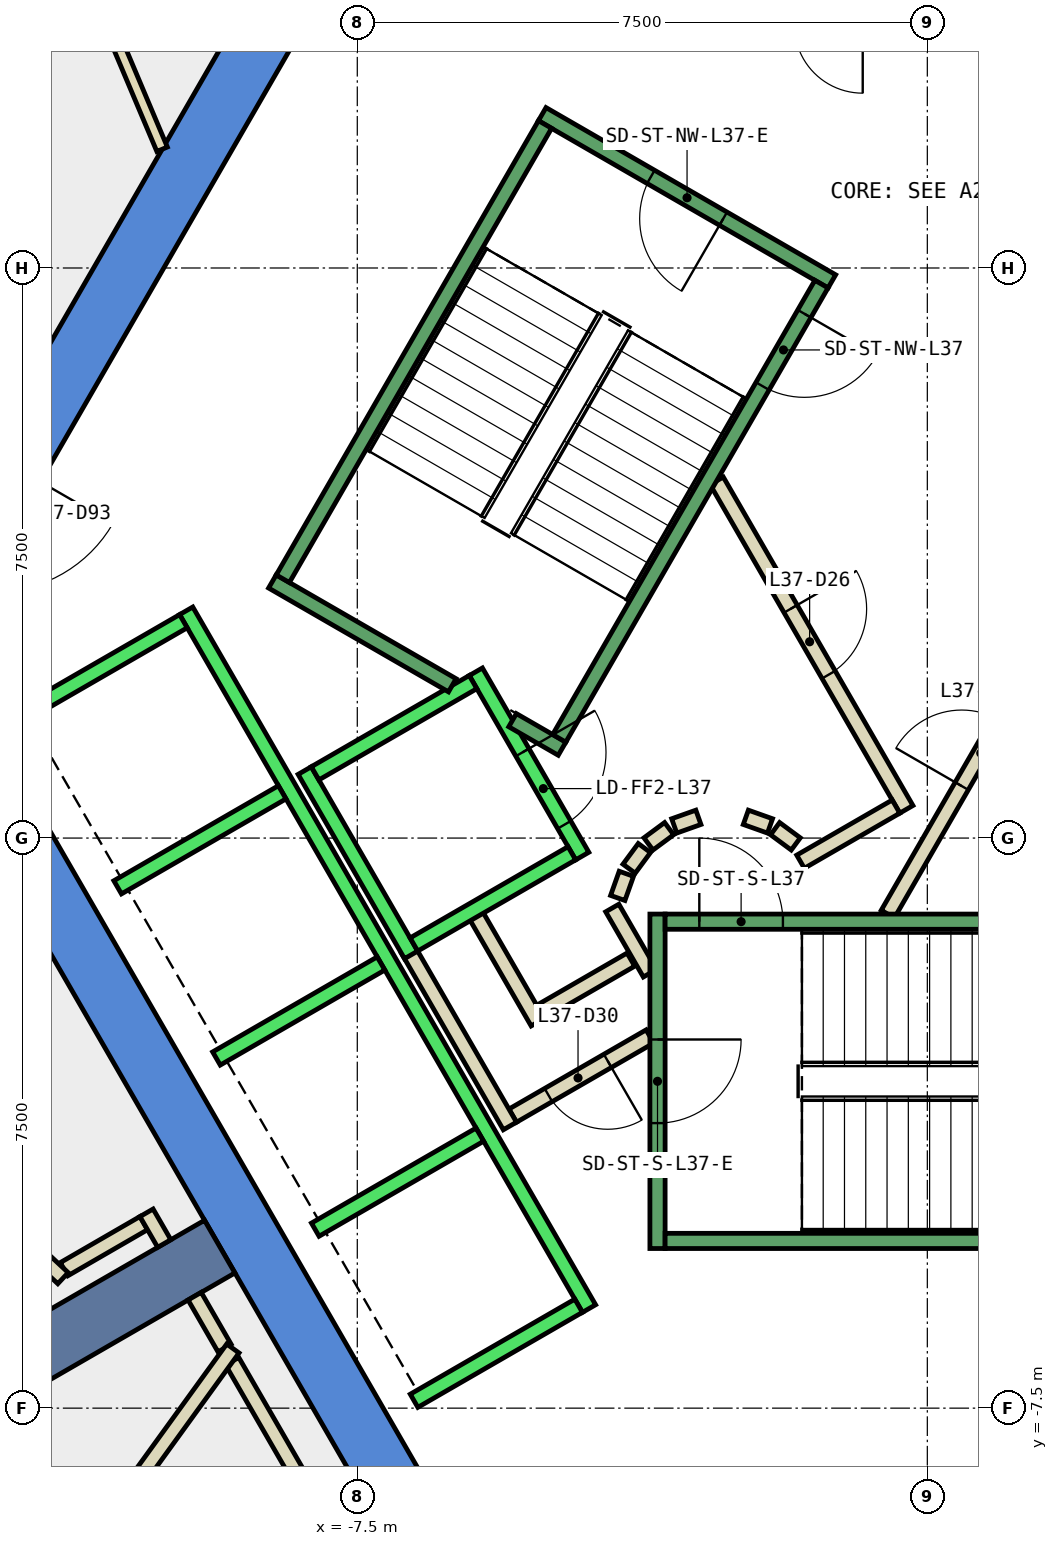
"""IFC4 building model, lengths in metres.
Left out: names, types, materials, properties, quantities, classifications, styles, units other than length and angle.
Written with IfcOpenShell. Run it as: python <this file> out.ifc"""

import sys

from ifc_helpers import new_model, si_unit, direction, frame, frame_2d, origin, place, context, subcontext, project, spatial, polyline, rectangle, outline, extrude, element, fill, save


model = new_model("IFC4")
c1 = context("Model", 3, precision=1e-05, world=origin(), true_north=direction((0.0, 1.0)))
c2 = subcontext(c1, "Body", "Model", "MODEL_VIEW")
j1 = project(units=[si_unit("LENGTHUNIT", "METRE"), si_unit("PLANEANGLEUNIT", "RADIAN")], contexts=[c1])
p1 = place(None, origin())
s1 = spatial("IfcSite", under=j1, at=p1, CompositionType="ELEMENT")
p2 = place(p1, origin())
s2 = spatial("IfcBuilding", under=s1, at=p2, CompositionType="ELEMENT")
p3 = place(p2, frame((0.0, 0.0, 167.6)))
s3 = spatial("IfcBuildingStorey", under=s2, at=p3, CompositionType="ELEMENT", Elevation=167.6)
p4 = place(p3, frame((0.0, 0.0, -0.4)))
e1 = element("IfcWall", 1, at=p4, inside=s3, PredefinedType="SHEAR", context=c2, shape_type="SweptSolid", body=[
    extrude(outline(polyline([(-12.267, 5.252), (-11.575, 4.852), (-6.466, 13.7), (-6.928, 14.5), (-12.267, 5.252)])), origin(), (0.0, 0.0, 1.0), 4.2),
])
p5 = place(p3, frame((0.0, 0.0, -0.4)))
e2 = element("IfcWall", 2, at=p5, inside=s3, PredefinedType="SHEAR", context=c2, shape_type="SweptSolid", body=[
    extrude(outline(polyline([(-13.856, 2.5), (-6.928, -9.5), (-6.466, -8.7), (-12.933, 2.5), (-13.856, 2.5)])), origin(), (0.0, 0.0, 1.0), 4.2),
])
p6 = place(p3, frame((-9.31, -5.375, -0.4), z_axis=(0.0, 0.0, 1.0), x_axis=(-0.866017533419, -0.500013631625, 0.0)))
e3 = element("IfcWall", 3, at=p6, inside=s3, PredefinedType="SHEAR", context=c2, shape_type="SweptSolid", body=[
    extrude(rectangle(XDim=9.0, YDim=0.8, at=frame_2d((4.5, 0.0))), origin(), (0.0, 0.0, 1.0), 4.2),
])
p7 = place(p3, frame((-3.9, -1.599, 0.0), z_axis=(0.0, 0.0, 1.0), x_axis=(-0.865969445389, -0.500096910261, 0.0)))
e4 = element("IfcWall", 4, at=p7, inside=s3, PredefinedType="PARTITIONING", context=c2, shape_type="SweptSolid", body=[
    extrude(rectangle(XDim=1.373, YDim=0.2, at=frame_2d((0.687, 0.0))), origin(), (0.0, 0.0, 1.0), 3.8),
])
p8 = place(p3, frame((-5.126, -2.422, 0.0), z_axis=(0.0, 0.0, 1.0), x_axis=(-0.500062241894, 0.865989465428, 0.0)))
e5 = element("IfcWall", 5, at=p8, inside=s3, PredefinedType="PARTITIONING", context=c2, shape_type="SweptSolid", body=[
    extrude(rectangle(XDim=1.7, YDim=0.2, at=frame_2d((0.85, 0.0))), origin(), (0.0, 0.0, 1.0), 3.8),
])
p9 = place(p3, frame((-3.65, -2.61, 0.0), z_axis=(0.0, 0.0, 1.0), x_axis=(-0.866072462134, -0.499918483688, 0.0)))
e6 = element("IfcWall", 6, at=p9, inside=s3, PredefinedType="PARTITIONING", context=c2, shape_type="SweptSolid", body=[
    extrude(rectangle(XDim=2.084, YDim=0.2, at=frame_2d((1.042, 0.0))), origin(), (0.0, 0.0, 1.0), 3.8),
])
p10 = place(p9, frame((0.642, 0.0, 0.0)))
e7 = element("IfcOpeningElement", 7, at=p10, cuts=e6, PredefinedType="OPENING", context=c2, shape_type="SweptSolid", body=[
    extrude(rectangle(XDim=0.9, YDim=2.1, at=frame_2d((0.45, 1.05))), frame((0.0, 0.11, 0.0), z_axis=(0.0, -1.0, 0.0), x_axis=(1.0, 0.0, 0.0)), (0.0, 0.0, 1.0), 0.22),
])
p11 = place(p3, frame((-5.492, -3.788, 0.0), z_axis=(0.0, 0.0, 1.0), x_axis=(-0.500008949224, 0.866020236886, 0.0)))
e8 = element("IfcWall", 8, at=p11, inside=s3, PredefinedType="PARTITIONING", context=c2, shape_type="SweptSolid", body=[
    extrude(rectangle(XDim=2.68, YDim=0.2, at=frame_2d((1.34, 0.0))), origin(), (0.0, 0.0, 1.0), 3.8),
])
p12 = place(p3, frame((-4.145, -0.92, 0.0), z_axis=(0.0, 0.0, 1.0), x_axis=(0.499743786207, -0.866173278362, 0.0)))
e9 = element("IfcWall", 9, at=p12, inside=s3, PredefinedType="PARTITIONING", context=c2, shape_type="SweptSolid", body=[
    extrude(rectangle(XDim=0.991, YDim=0.2, at=frame_2d((0.495, 0.0))), origin(), (0.0, 0.0, 1.0), 3.8),
])
p13 = place(p3, frame((-10.068, 9.062, 0.0), z_axis=(0.0, 0.0, 1.0), x_axis=(-0.388992587102, 0.921240884448, 0.0)))
e10 = element("IfcWall", 10, at=p13, inside=s3, PredefinedType="PARTITIONING", context=c2, shape_type="SweptSolid", body=[
    extrude(rectangle(XDim=4.257, YDim=0.15, at=frame_2d((2.128, 0.0))), origin(), (0.0, 0.0, 1.0), 3.8),
])
p14 = place(p3, frame((-0.52, -1.0, 0.0), z_axis=(0.0, 0.0, 1.0), x_axis=(0.50011622646, 0.865958290007, 0.0)))
e11 = element("IfcWall", 11, at=p14, inside=s3, PredefinedType="PARTITIONING", context=c2, shape_type="SweptSolid", body=[
    extrude(rectangle(XDim=4.991, YDim=0.2, at=frame_2d((2.496, 0.0))), origin(), (0.0, 0.0, 1.0), 3.8),
])
p15 = place(p14, frame((1.945, 0.0, 0.0)))
e12 = element("IfcOpeningElement", 12, at=p15, cuts=e11, PredefinedType="OPENING", context=c2, shape_type="SweptSolid", body=[
    extrude(rectangle(XDim=1.0, YDim=2.1, at=frame_2d((0.5, 1.05))), frame((0.0, 0.11, 0.0), z_axis=(0.0, -1.0, 0.0), x_axis=(1.0, 0.0, 0.0)), (0.0, 0.0, 1.0), 0.22),
])
p16 = place(p3, frame((-2.771, 4.7, 0.0), z_axis=(0.0, 0.0, 1.0), x_axis=(0.499969479948, -0.866043023828, 0.0)))
e13 = element("IfcWall", 13, at=p16, inside=s3, PredefinedType="PARTITIONING", context=c2, shape_type="SweptSolid", body=[
    extrude(rectangle(XDim=4.99, YDim=0.2, at=frame_2d((2.495, 0.0))), origin(), (0.0, 0.0, 1.0), 3.8),
])
p17 = place(p16, frame((1.945, 0.0, 0.0)))
e14 = element("IfcOpeningElement", 14, at=p17, cuts=e13, PredefinedType="OPENING", context=c2, shape_type="SweptSolid", body=[
    extrude(rectangle(XDim=1.0, YDim=2.1, at=frame_2d((0.5, 1.05))), frame((0.0, 0.11, 0.0), z_axis=(0.0, -1.0, 0.0), x_axis=(1.0, 0.0, 0.0)), (0.0, 0.0, 1.0), 0.22),
])
p18 = place(p3, frame((-0.412, 0.414, 0.0), z_axis=(0.0, 0.0, 1.0), x_axis=(-0.866017369001, -0.500013916395, 0.0)))
e15 = element("IfcWall", 15, at=p18, inside=s3, PredefinedType="PARTITIONING", context=c2, shape_type="SweptSolid", body=[
    extrude(rectangle(XDim=1.45, YDim=0.2, at=frame_2d((0.725, 0.0))), origin(), (0.0, 0.0, 1.0), 3.8),
])
p19 = place(p3, frame((-1.731, -0.077, 0.0), z_axis=(0.0, 0.0, 1.0), x_axis=(-0.804311165252, 0.594208338422, 0.0)))
e16 = element("IfcWall", 16, at=p19, inside=s3, PredefinedType="PARTITIONING", context=c2, shape_type="SweptSolid", body=[
    extrude(rectangle(XDim=0.338, YDim=0.2, at=frame_2d((0.169, 0.0))), origin(), (0.0, 0.0, 1.0), 3.8),
])
p20 = place(p3, frame((-2.07, 0.16, 0.0), z_axis=(0.0, 0.0, 1.0), x_axis=(-0.942199461132, 0.335052496547, 0.0)))
e17 = element("IfcWall", 17, at=p20, inside=s3, PredefinedType="PARTITIONING", context=c2, shape_type="SweptSolid", body=[
    extrude(rectangle(XDim=0.337, YDim=0.2, at=frame_2d((0.169, 0.0))), origin(), (0.0, 0.0, 1.0), 3.8),
])
p21 = place(p3, frame((-3.012, 0.273, 0.0), z_axis=(0.0, 0.0, 1.0), x_axis=(-0.942280615813, -0.334824194261, 0.0)))
e18 = element("IfcWall", 18, at=p21, inside=s3, PredefinedType="PARTITIONING", context=c2, shape_type="SweptSolid", body=[
    extrude(rectangle(XDim=0.338, YDim=0.2, at=frame_2d((0.169, 0.0))), origin(), (0.0, 0.0, 1.0), 3.8),
])
p22 = place(p3, frame((-3.397, 0.124, 0.0), z_axis=(0.0, 0.0, 1.0), x_axis=(-0.804311165252, -0.594208338422, 0.0)))
e19 = element("IfcWall", 19, at=p22, inside=s3, PredefinedType="PARTITIONING", context=c2, shape_type="SweptSolid", body=[
    extrude(rectangle(XDim=0.338, YDim=0.2, at=frame_2d((0.169, 0.0))), origin(), (0.0, 0.0, 1.0), 3.8),
])
p23 = place(p3, frame((-3.723, -0.131, 0.0), z_axis=(0.0, 0.0, 1.0), x_axis=(-0.594675113454, -0.803966112121, 0.0)))
e20 = element("IfcWall", 20, at=p23, inside=s3, PredefinedType="PARTITIONING", context=c2, shape_type="SweptSolid", body=[
    extrude(rectangle(XDim=0.338, YDim=0.2, at=frame_2d((0.169, 0.0))), origin(), (0.0, 0.0, 1.0), 3.8),
])
p24 = place(p3, frame((-3.96, -0.47, 0.0), z_axis=(0.0, 0.0, 1.0), x_axis=(-0.334824194261, -0.942280615813, 0.0)))
e21 = element("IfcWall", 21, at=p24, inside=s3, PredefinedType="PARTITIONING", context=c2, shape_type="SweptSolid", body=[
    extrude(rectangle(XDim=0.338, YDim=0.2, at=frame_2d((0.169, 0.0))), origin(), (0.0, 0.0, 1.0), 3.8),
])
p25 = place(p3, frame((-7.862, -9.107, 0.0), z_axis=(0.0, 0.0, 1.0), x_axis=(-0.499994038704, 0.866028845513, 0.0)))
e22 = element("IfcWall", 22, at=p25, inside=s3, PredefinedType="PARTITIONING", context=c2, shape_type="SweptSolid", body=[
    extrude(rectangle(XDim=2.568, YDim=0.2, at=frame_2d((1.284, 0.0))), origin(), (0.0, 0.0, 1.0), 3.8),
])
p26 = place(p3, frame((-9.246, -6.71, 0.0), z_axis=(0.0, 0.0, 1.0), x_axis=(-0.499570510076, 0.86627322795, 0.0)))
e23 = element("IfcWall", 23, at=p26, inside=s3, PredefinedType="PARTITIONING", context=c2, shape_type="SweptSolid", body=[
    extrude(rectangle(XDim=0.788, YDim=0.2, at=frame_2d((0.394, 0.0))), origin(), (0.0, 0.0, 1.0), 3.8),
])
p27 = place(p3, frame((-10.31, -5.066, 0.0), z_axis=(0.0, 0.0, 1.0), x_axis=(-0.865587329375, -0.500758000661, 0.0)))
e24 = element("IfcWall", 24, at=p27, inside=s3, PredefinedType="PARTITIONING", context=c2, shape_type="SweptSolid", body=[
    extrude(rectangle(XDim=1.21, YDim=0.2, at=frame_2d((0.605, 0.0))), origin(), (0.0, 0.0, 1.0), 3.8),
])
p28 = place(p3, frame((-11.372, -5.79, 0.0), z_axis=(0.0, 0.0, 1.0), x_axis=(-0.730922728623, 0.682460229451, 0.0)))
e25 = element("IfcWall", 25, at=p28, inside=s3, PredefinedType="PARTITIONING", context=c2, shape_type="SweptSolid", body=[
    extrude(rectangle(XDim=9.924, YDim=0.2, at=frame_2d((4.962, 0.0))), origin(), (0.0, 0.0, 1.0), 3.8),
])
p29 = place(p3, frame((-13.744, -13.076, 0.0), z_axis=(0.0, 0.0, 1.0), x_axis=(0.586577314901, 0.809893235953, 0.0)))
e26 = element("IfcWall", 26, at=p29, inside=s3, PredefinedType="PARTITIONING", context=c2, shape_type="SweptSolid", body=[
    extrude(rectangle(XDim=7.854, YDim=0.2, at=frame_2d((3.927, 0.0))), origin(), (0.0, 0.0, 1.0), 3.8),
])
p30 = place(p3, frame((-10.04, -5.334, 0.0), z_axis=(0.0, 0.0, 1.0), x_axis=(-0.499405191234, 0.86636854454, 0.0)))
e27 = element("IfcWall", 27, at=p30, inside=s3, PredefinedType="PARTITIONING", context=c2, shape_type="SweptSolid", body=[
    extrude(rectangle(XDim=0.466, YDim=0.2, at=frame_2d((0.233, 0.0))), origin(), (0.0, 0.0, 1.0), 3.8),
])
p31 = place(p3, frame((-5.94, 2.188, 0.0), z_axis=(0.0, 0.0, 1.0), x_axis=(0.49994636267, -0.866056369097, 0.0)))
e28 = element("IfcWall", 28, at=p31, inside=s3, PredefinedType="STANDARD", context=c2, shape_type="SweptSolid", body=[
    extrude(rectangle(XDim=2.8, YDim=0.2, at=frame_2d((1.4, 0.0))), origin(), (0.0, 0.0, 1.0), 3.8),
])
p32 = place(p31, frame((1.225, 0.0, 0.0)))
e29 = element("IfcOpeningElement", 29, at=p32, cuts=e28, PredefinedType="OPENING", context=c2, shape_type="SweptSolid", body=[
    extrude(rectangle(XDim=1.1, YDim=2.1, at=frame_2d((0.55, 1.05))), frame((0.0, 0.11, 0.0), z_axis=(0.0, -1.0, 0.0), x_axis=(1.0, 0.0, 0.0)), (0.0, 0.0, 1.0), 0.22),
])
p33 = place(p3, frame((-8.192, 0.888, 0.0), z_axis=(0.0, 0.0, 1.0), x_axis=(0.49994636267, -0.866056369097, 0.0)))
e30 = element("IfcWall", 30, at=p33, inside=s3, PredefinedType="STANDARD", context=c2, shape_type="SweptSolid", body=[
    extrude(rectangle(XDim=2.8, YDim=0.2, at=frame_2d((1.4, 0.0))), origin(), (0.0, 0.0, 1.0), 3.8),
])
for number, where, z_axis, x_axis in (
    (31, (-5.977, 2.052, 0.0), (0.0, 0.0, 1.0), (-0.866, -0.5, 0.0)),
    (32, (-4.677, -0.2, 0.0), (0.0, 0.0, 1.0), (-0.866, -0.5, 0.0)),
):
    element("IfcWall", number, at=place(p3, frame(where, z_axis=z_axis, x_axis=x_axis)), inside=s3, PredefinedType="STANDARD", context=c2, shape_type="SweptSolid", body=[
        extrude(rectangle(XDim=2.399, YDim=0.2, at=frame_2d((1.2, 0.0))), origin(), (0.0, 0.0, 1.0), 3.8),
    ])
p34 = place(p3, frame((-9.751, 2.99, 0.0), z_axis=(0.0, 0.0, 1.0), x_axis=(0.50000090737, -0.866024879913, 0.0)))
e33 = element("IfcWall", 33, at=p34, inside=s3, PredefinedType="STANDARD", context=c2, shape_type="SweptSolid", body=[
    extrude(rectangle(XDim=10.6, YDim=0.2, at=frame_2d((5.3, 0.0))), origin(), (0.0, 0.0, 1.0), 3.8),
])
p35 = place(p3, frame((-9.788, 2.853, 0.0), z_axis=(0.0, 0.0, 1.0), x_axis=(-0.865998541277, -0.500046524342, 0.0)))
e34 = element("IfcWall", 34, at=p35, inside=s3, PredefinedType="STANDARD", context=c2, shape_type="SweptSolid", body=[
    extrude(rectangle(XDim=2.5, YDim=0.2, at=frame_2d((1.25, 0.0))), origin(), (0.0, 0.0, 1.0), 3.8),
])
for number, where, z_axis, x_axis in (
    (35, (-8.488, 0.602, 0.0), (0.0, 0.0, 1.0), (-0.866, -0.5, 0.0)),
    (36, (-7.188, -1.65, 0.0), (0.0, 0.0, 1.0), (-0.866, -0.5, 0.0)),
    (37, (-5.888, -3.902, 0.0), (0.0, 0.0, 1.0), (-0.866, -0.5, 0.0)),
    (38, (-4.588, -6.153, 0.0), (0.0, 0.0, 1.0), (-0.866, -0.5, 0.0)),
):
    element("IfcWall", number, at=place(p3, frame(where, z_axis=z_axis, x_axis=x_axis)), inside=s3, PredefinedType="STANDARD", context=c2, shape_type="SweptSolid", body=[
        extrude(rectangle(XDim=2.5, YDim=0.2, at=frame_2d((1.25, 0.0))), origin(), (0.0, 0.0, 1.0), 3.8),
    ])
p36 = place(p3, frame((-3.55, -1.0, 0.0), z_axis=(0.0, 0.0, 1.0), x_axis=(0.0, -1.0, 0.0)))
e39 = element("IfcWall", 39, at=p36, inside=s3, PredefinedType="STANDARD", context=c2, shape_type="SweptSolid", body=[
    extrude(rectangle(XDim=4.4, YDim=0.2, at=frame_2d((2.2, 0.0))), origin(), (0.0, 0.0, 1.0), 3.8),
])
p37 = place(p36, frame((1.65, 0.0, 0.0)))
e40 = element("IfcOpeningElement", 40, at=p37, cuts=e39, PredefinedType="OPENING", context=c2, shape_type="SweptSolid", body=[
    extrude(rectangle(XDim=1.1, YDim=2.2, at=frame_2d((0.55, 1.1))), frame((0.0, 0.11, 0.0), z_axis=(0.0, -1.0, 0.0), x_axis=(1.0, 0.0, 0.0)), (0.0, 0.0, 1.0), 0.22),
])
p38 = place(p3, frame((-3.45, -1.1, 0.0), z_axis=(0.0, 0.0, 1.0), x_axis=(1.0, 0.0, 0.0)))
e41 = element("IfcWall", 41, at=p38, inside=s3, PredefinedType="STANDARD", context=c2, shape_type="SweptSolid", body=[
    extrude(rectangle(XDim=6.9, YDim=0.2, at=frame_2d((3.45, 0.0))), origin(), (0.0, 0.0, 1.0), 3.8),
])
p39 = place(p38, frame((0.45, 0.0, 0.0)))
e42 = element("IfcOpeningElement", 42, at=p39, cuts=e41, PredefinedType="OPENING", context=c2, shape_type="SweptSolid", body=[
    extrude(rectangle(XDim=1.1, YDim=2.2, at=frame_2d((0.55, 1.1))), frame((0.0, 0.11, 0.0), z_axis=(0.0, -1.0, 0.0), x_axis=(1.0, 0.0, 0.0)), (0.0, 0.0, 1.0), 0.22),
])
p40 = place(p3, frame((-3.45, -5.3, 0.0), z_axis=(0.0, 0.0, 1.0), x_axis=(1.0, 0.0, 0.0)))
e43 = element("IfcWall", 43, at=p40, inside=s3, PredefinedType="STANDARD", context=c2, shape_type="SweptSolid", body=[
    extrude(rectangle(XDim=6.9, YDim=0.2, at=frame_2d((3.45, 0.0))), origin(), (0.0, 0.0, 1.0), 3.8),
])
p41 = place(p3, frame((-1.256, 7.324, 0.0), z_axis=(0.0, 0.0, 1.0), x_axis=(-0.866046073146, 0.499964197906, 0.0)))
e44 = element("IfcWall", 44, at=p41, inside=s3, PredefinedType="STANDARD", context=c2, shape_type="SweptSolid", body=[
    extrude(rectangle(XDim=4.4, YDim=0.2, at=frame_2d((2.2, 0.0))), origin(), (0.0, 0.0, 1.0), 3.8),
])
p42 = place(p41, frame((1.65, 0.0, 0.0)))
e45 = element("IfcOpeningElement", 45, at=p42, cuts=e44, PredefinedType="OPENING", context=c2, shape_type="SweptSolid", body=[
    extrude(rectangle(XDim=1.1, YDim=2.2, at=frame_2d((0.55, 1.1))), frame((0.0, 0.11, 0.0), z_axis=(0.0, -1.0, 0.0), x_axis=(1.0, 0.0, 0.0)), (0.0, 0.0, 1.0), 0.22),
])
p43 = place(p3, frame((-6.25, 2.01, 0.0), z_axis=(0.0, 0.0, 1.0), x_axis=(-0.86611865017, 0.499838457731, 0.0)))
e46 = element("IfcWall", 46, at=p43, inside=s3, PredefinedType="STANDARD", context=c2, shape_type="SweptSolid", body=[
    extrude(rectangle(XDim=2.733, YDim=0.2, at=frame_2d((1.366, 0.0))), origin(), (0.0, 0.0, 1.0), 3.8),
])
p44 = place(p3, frame((-4.806, 1.176, 0.0), z_axis=(0.0, 0.0, 1.0), x_axis=(-0.866558586415, 0.499075361355, 0.0)))
e47 = element("IfcWall", 47, at=p44, inside=s3, PredefinedType="STANDARD", context=c2, shape_type="SweptSolid", body=[
    extrude(rectangle(XDim=0.751, YDim=0.2, at=frame_2d((0.376, 0.0))), origin(), (0.0, 0.0, 1.0), 3.8),
])
p45 = place(p3, frame((-1.393, 7.288, 0.0), z_axis=(0.0, 0.0, 1.0), x_axis=(-0.499963383562, -0.866046543262, 0.0)))
e48 = element("IfcWall", 48, at=p45, inside=s3, PredefinedType="STANDARD", context=c2, shape_type="SweptSolid", body=[
    extrude(rectangle(XDim=6.9, YDim=0.2, at=frame_2d((3.45, 0.0))), origin(), (0.0, 0.0, 1.0), 3.8),
])
p46 = place(p45, frame((0.45, 0.0, 0.0)))
e49 = element("IfcOpeningElement", 49, at=p46, cuts=e48, PredefinedType="OPENING", context=c2, shape_type="SweptSolid", body=[
    extrude(rectangle(XDim=1.1, YDim=2.2, at=frame_2d((0.55, 1.1))), frame((0.0, 0.11, 0.0), z_axis=(0.0, -1.0, 0.0), x_axis=(1.0, 0.0, 0.0)), (0.0, 0.0, 1.0), 0.22),
])
p47 = place(p3, frame((-5.03, 9.388, 0.0), z_axis=(0.0, 0.0, 1.0), x_axis=(-0.499978703459, -0.866037698999, 0.0)))
e50 = element("IfcWall", 50, at=p47, inside=s3, PredefinedType="STANDARD", context=c2, shape_type="SweptSolid", body=[
    extrude(rectangle(XDim=6.9, YDim=0.2, at=frame_2d((3.45, 0.0))), origin(), (0.0, 0.0, 1.0), 3.8),
])
p48 = place(p15, origin())
e51 = element("IfcDoor", 51, at=p48, inside=s3, OperationType="SINGLE_SWING_LEFT", PredefinedType="DOOR", context=c2, shape_type="SweptSolid", body=[
    extrude(rectangle(XDim=1.0, YDim=2.1, at=frame_2d((0.5, 1.05))), frame((0.0, 0.025, 0.0), z_axis=(0.0, -1.0, 0.0), x_axis=(1.0, 0.0, 0.0)), (0.0, 0.0, 1.0), 0.05),
])
fill(e12, e51)
p49 = place(p17, origin())
e52 = element("IfcDoor", 52, at=p49, inside=s3, OperationType="SINGLE_SWING_RIGHT", PredefinedType="DOOR", context=c2, shape_type="SweptSolid", body=[
    extrude(rectangle(XDim=1.0, YDim=2.1, at=frame_2d((0.5, 1.05))), frame((0.0, 0.025, 0.0), z_axis=(0.0, -1.0, 0.0), x_axis=(1.0, 0.0, 0.0)), (0.0, 0.0, 1.0), 0.05),
])
fill(e14, e52)
p50 = place(p10, origin())
e53 = element("IfcDoor", 53, at=p50, inside=s3, OperationType="SINGLE_SWING_LEFT", PredefinedType="DOOR", context=c2, shape_type="SweptSolid", body=[
    extrude(rectangle(XDim=0.9, YDim=2.1, at=frame_2d((0.45, 1.05))), frame((0.0, 0.025, 0.0), z_axis=(0.0, -1.0, 0.0), x_axis=(1.0, 0.0, 0.0)), (0.0, 0.0, 1.0), 0.05),
])
fill(e7, e53)
p51 = place(p32, origin())
e54 = element("IfcDoor", 54, at=p51, inside=s3, OperationType="SLIDING_TO_LEFT", PredefinedType="DOOR", context=c2, shape_type="SweptSolid", body=[
    extrude(rectangle(XDim=1.1, YDim=2.1, at=frame_2d((0.55, 1.05))), frame((0.0, 0.025, 0.0), z_axis=(0.0, -1.0, 0.0), x_axis=(1.0, 0.0, 0.0)), (0.0, 0.0, 1.0), 0.05),
])
fill(e29, e54)
p52 = place(p39, origin())
e55 = element("IfcDoor", 55, at=p52, inside=s3, OperationType="SINGLE_SWING_LEFT", PredefinedType="DOOR", context=c2, shape_type="SweptSolid", body=[
    extrude(rectangle(XDim=1.1, YDim=2.2, at=frame_2d((0.55, 1.1))), frame((0.0, 0.025, 0.0), z_axis=(0.0, -1.0, 0.0), x_axis=(1.0, 0.0, 0.0)), (0.0, 0.0, 1.0), 0.05),
])
fill(e42, e55)
p53 = place(p37, origin())
e56 = element("IfcDoor", 56, at=p53, inside=s3, OperationType="SINGLE_SWING_LEFT", PredefinedType="DOOR", context=c2, shape_type="SweptSolid", body=[
    extrude(rectangle(XDim=1.1, YDim=2.2, at=frame_2d((0.55, 1.1))), frame((0.0, 0.025, 0.0), z_axis=(0.0, -1.0, 0.0), x_axis=(1.0, 0.0, 0.0)), (0.0, 0.0, 1.0), 0.05),
])
fill(e40, e56)
p54 = place(p46, origin())
e57 = element("IfcDoor", 57, at=p54, inside=s3, OperationType="SINGLE_SWING_LEFT", PredefinedType="DOOR", context=c2, shape_type="SweptSolid", body=[
    extrude(rectangle(XDim=1.1, YDim=2.2, at=frame_2d((0.55, 1.1))), frame((0.0, 0.025, 0.0), z_axis=(0.0, -1.0, 0.0), x_axis=(1.0, 0.0, 0.0)), (0.0, 0.0, 1.0), 0.05),
])
fill(e49, e57)
p55 = place(p42, origin())
e58 = element("IfcDoor", 58, at=p55, inside=s3, OperationType="SINGLE_SWING_LEFT", PredefinedType="DOOR", context=c2, shape_type="SweptSolid", body=[
    extrude(rectangle(XDim=1.1, YDim=2.2, at=frame_2d((0.55, 1.1))), frame((0.0, 0.025, 0.0), z_axis=(0.0, -1.0, 0.0), x_axis=(1.0, 0.0, 0.0)), (0.0, 0.0, 1.0), 0.05),
])
fill(e45, e58)
save(model, sys.argv[1])
